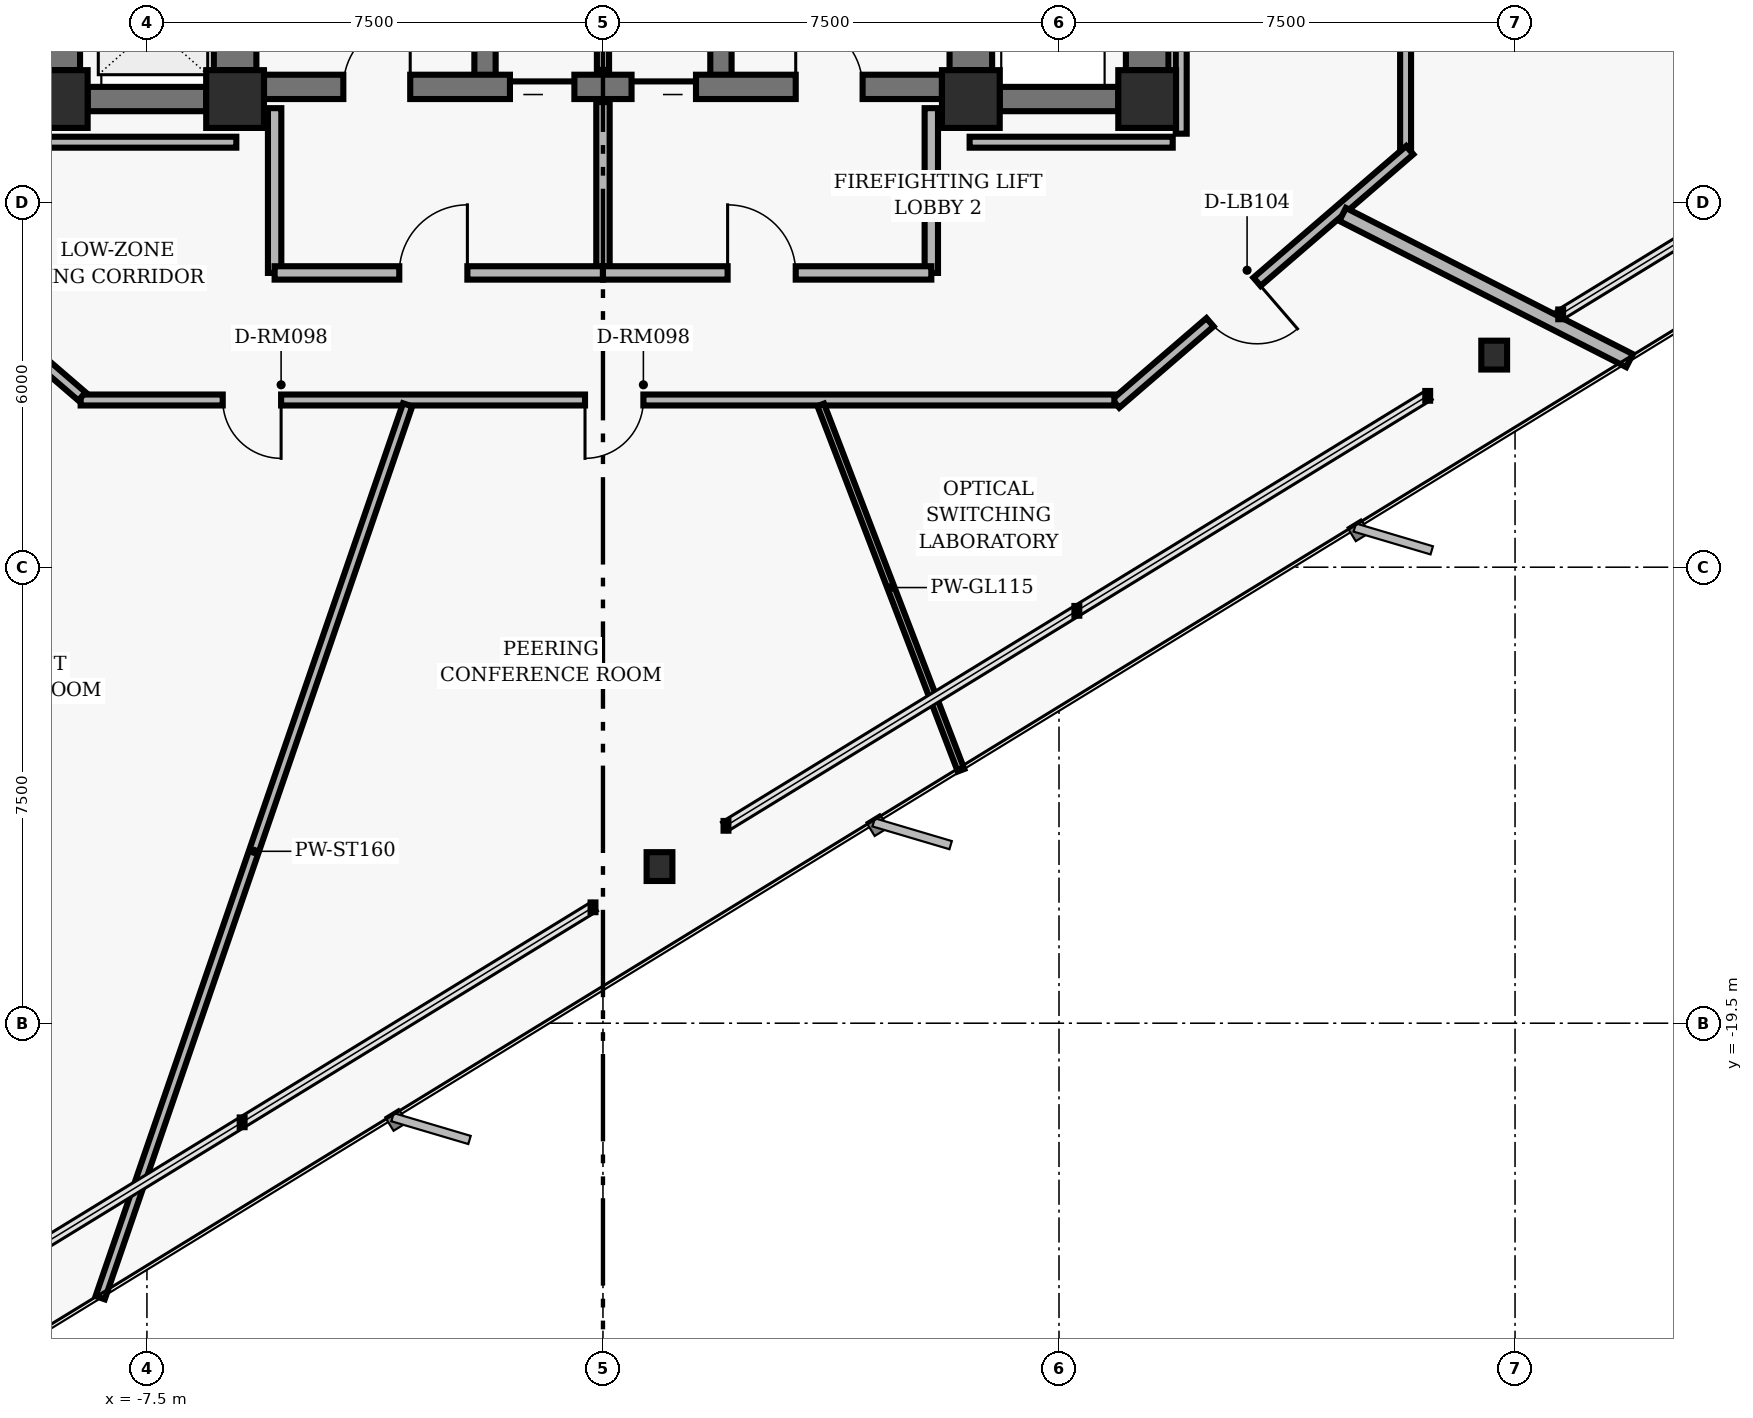
"""IFC4 building model, lengths in metres.
Left out: names, types, materials, properties, quantities, classifications, styles, units other than length and angle.
Written with IfcOpenShell. Run it as: python <this file> out.ifc"""

import sys

from ifc_helpers import new_model, si_unit, direction, frame, frame_2d, origin, origin_2d, place, context, subcontext, project, spatial, rectangle, hollow_rectangle, i_section, extrude, element, fill, save


model = new_model("IFC4")
c1 = context("Model", 3, precision=1e-05, world=origin(), true_north=direction((0.0, 1.0)))
c2 = subcontext(c1, "Body", "Model", "MODEL_VIEW")
j1 = project(units=[si_unit("LENGTHUNIT", "METRE"), si_unit("PLANEANGLEUNIT", "RADIAN")], contexts=[c1])
p1 = place(None, origin())
s1 = spatial("IfcSite", under=j1, at=p1, CompositionType="ELEMENT")
p2 = place(p1, origin())
s2 = spatial("IfcBuilding", under=s1, at=p2, CompositionType="ELEMENT")
p3 = place(p2, frame((0.0, 0.0, 32.32)))
s3 = spatial("IfcBuildingStorey", under=s2, at=p3, CompositionType="ELEMENT", Elevation=32.32)
for number, where, z_axis, x_axis in (
    (1, (-6.05, -4.3, 0.0), (0.0, 0.0, 1.0), (1.0, 0.0, 0.0)),
    (2, (6.05, -4.3, 0.0), (0.0, 0.0, 1.0), (1.0, 0.0, 0.0)),
    (3, (-8.95, -4.3, 0.0), (0.0, 0.0, 1.0), (1.0, 0.0, 0.0)),
    (4, (8.95, -4.3, 0.0), (0.0, 0.0, 1.0), (1.0, 0.0, 0.0)),
):
    element("IfcColumn", number, at=place(p3, frame(where, z_axis=z_axis, x_axis=x_axis)), inside=s3, PredefinedType="COLUMN", context=c2, shape_type="SweptSolid", body=[
        extrude(hollow_rectangle(XDim=0.95, YDim=0.95, WallThickness=0.06, InnerFilletRadius=0.02, OuterFilletRadius=0.04, at=origin_2d()), origin(), (0.0, 0.0, 1.0), 3.36),
    ])
for number, where, z_axis, x_axis in (
    (5, (-6.05, -3.825, 0.0), (0.0, 0.0, 1.0), (0.0, 1.0, 0.0)),
    (6, (6.05, -3.825, 0.0), (0.0, 0.0, 1.0), (0.0, 1.0, 0.0)),
):
    element("IfcWall", number, at=place(p3, frame(where, z_axis=z_axis, x_axis=x_axis)), inside=s3, PredefinedType="SHEAR", context=c2, shape_type="SweptSolid", body=[
        extrude(rectangle(XDim=3.35, YDim=0.7, at=frame_2d((1.675, 0.0))), origin(), (0.0, 0.0, 1.0), 3.098),
    ])
for number, where, z_axis, x_axis in (
    (7, (-1.94, -4.1, 0.0), (0.0, 0.0, 1.0), (0.0, 1.0, 0.0)),
    (8, (1.94, -4.1, 0.0), (0.0, 0.0, 1.0), (0.0, 1.0, 0.0)),
):
    element("IfcWall", number, at=place(p3, frame(where, z_axis=z_axis, x_axis=x_axis)), inside=s3, PredefinedType="SHEAR", context=c2, shape_type="SweptSolid", body=[
        extrude(rectangle(XDim=8.2, YDim=0.35, at=frame_2d((4.1, 0.0))), origin(), (0.0, 0.0, 1.0), 3.098),
    ])
p4 = place(p3, frame((-5.575, -4.1, 0.0), z_axis=(0.0, 0.0, 1.0), x_axis=(1.0, 0.0, 0.0)))
e9 = element("IfcWall", 9, at=p4, inside=s3, PredefinedType="SHEAR", context=c2, shape_type="SweptSolid", body=[
    extrude(rectangle(XDim=11.15, YDim=0.4, at=frame_2d((5.575, 0.0))), origin(), (0.0, 0.0, 1.0), 3.098),
])
p5 = place(p4, frame((1.305, 0.0, 0.0)))
e10 = element("IfcOpeningElement", 10, at=p5, cuts=e9, PredefinedType="OPENING", context=c2, shape_type="SweptSolid", body=[
    extrude(rectangle(XDim=1.1, YDim=2.04, at=frame_2d((0.55, 1.02))), frame((0.0, 0.21, 0.0), z_axis=(0.0, -1.0, 0.0), x_axis=(1.0, 0.0, 0.0)), (0.0, 0.0, 1.0), 0.42),
])
p6 = place(p4, frame((8.745, 0.0, 0.0)))
e11 = element("IfcOpeningElement", 11, at=p6, cuts=e9, PredefinedType="OPENING", context=c2, shape_type="SweptSolid", body=[
    extrude(rectangle(XDim=1.1, YDim=2.04, at=frame_2d((0.55, 1.02))), frame((0.0, 0.21, 0.0), z_axis=(0.0, -1.0, 0.0), x_axis=(1.0, 0.0, 0.0)), (0.0, 0.0, 1.0), 0.42),
])
p7 = place(p4, frame((4.045, 0.0, 0.0)))
e12 = element("IfcOpeningElement", 12, at=p7, cuts=e9, PredefinedType="OPENING", context=c2, shape_type="SweptSolid", body=[
    extrude(rectangle(XDim=1.06, YDim=2.04, at=frame_2d((0.53, 1.02))), frame((0.0, 0.21, 0.0), z_axis=(0.0, -1.0, 0.0), x_axis=(1.0, 0.0, 0.0)), (0.0, 0.0, 1.0), 0.42),
])
p8 = place(p4, frame((6.045, 0.0, 0.0)))
e13 = element("IfcOpeningElement", 13, at=p8, cuts=e9, PredefinedType="OPENING", context=c2, shape_type="SweptSolid", body=[
    extrude(rectangle(XDim=1.06, YDim=2.04, at=frame_2d((0.53, 1.02))), frame((0.0, 0.21, 0.0), z_axis=(0.0, -1.0, 0.0), x_axis=(1.0, 0.0, 0.0)), (0.0, 0.0, 1.0), 0.42),
])
p9 = place(p3, frame((-8.95, -3.825, 0.0), z_axis=(0.0, 0.0, 1.0), x_axis=(0.0, 1.0, 0.0)))
e14 = element("IfcWall", 14, at=p9, inside=s3, PredefinedType="SHEAR", context=c2, shape_type="SweptSolid", body=[
    extrude(rectangle(XDim=7.85, YDim=0.7, at=frame_2d((3.925, 0.0))), origin(), (0.0, 0.0, 1.0), 3.098),
])
p10 = place(p9, frame((0.55, 0.0, 0.0)))
e15 = element("IfcOpeningElement", 15, at=p10, cuts=e14, PredefinedType="OPENING", context=c2, shape_type="SweptSolid", body=[
    extrude(rectangle(XDim=1.06, YDim=2.04, at=frame_2d((0.53, 1.02))), frame((0.0, 0.36, 0.0), z_axis=(0.0, -1.0, 0.0), x_axis=(1.0, 0.0, 0.0)), (0.0, 0.0, 1.0), 0.72),
])
p11 = place(p9, frame((3.395, 0.0, 0.0)))
e16 = element("IfcOpeningElement", 16, at=p11, cuts=e14, PredefinedType="OPENING", context=c2, shape_type="SweptSolid", body=[
    extrude(rectangle(XDim=1.06, YDim=2.04, at=frame_2d((0.53, 1.02))), frame((0.0, 0.36, 0.0), z_axis=(0.0, -1.0, 0.0), x_axis=(1.0, 0.0, 0.0)), (0.0, 0.0, 1.0), 0.72),
])
p12 = place(p9, frame((6.23, 0.0, 0.0)))
e17 = element("IfcOpeningElement", 17, at=p12, cuts=e14, PredefinedType="OPENING", context=c2, shape_type="SweptSolid", body=[
    extrude(rectangle(XDim=1.06, YDim=2.04, at=frame_2d((0.53, 1.02))), frame((0.0, 0.36, 0.0), z_axis=(0.0, -1.0, 0.0), x_axis=(1.0, 0.0, 0.0)), (0.0, 0.0, 1.0), 0.72),
])
p13 = place(p3, frame((-8.475, -4.3, 0.0), z_axis=(0.0, 0.0, 1.0), x_axis=(1.0, 0.0, 0.0)))
e18 = element("IfcWall", 18, at=p13, inside=s3, PredefinedType="SHEAR", context=c2, shape_type="SweptSolid", body=[
    extrude(rectangle(XDim=1.95, YDim=0.4, at=frame_2d((0.975, 0.0))), origin(), (0.0, 0.0, 1.0), 3.098),
])
p14 = place(p3, frame((8.95, -3.825, 0.0), z_axis=(0.0, 0.0, 1.0), x_axis=(0.0, 1.0, 0.0)))
e19 = element("IfcWall", 19, at=p14, inside=s3, PredefinedType="SHEAR", context=c2, shape_type="SweptSolid", body=[
    extrude(rectangle(XDim=7.85, YDim=0.7, at=frame_2d((3.925, 0.0))), origin(), (0.0, 0.0, 1.0), 3.098),
])
p15 = place(p3, frame((6.525, -4.3, 0.0), z_axis=(0.0, 0.0, 1.0), x_axis=(1.0, 0.0, 0.0)))
e20 = element("IfcWall", 20, at=p15, inside=s3, PredefinedType="SHEAR", context=c2, shape_type="SweptSolid", body=[
    extrude(rectangle(XDim=1.95, YDim=0.4, at=frame_2d((0.975, 0.0))), origin(), (0.0, 0.0, 1.0), 3.098),
])
for number, where, z_axis, x_axis in (
    (21, (0.93, -16.924, 0.0), (0.0, 0.0, 1.0), (1.0, 0.0, 0.0)),
    (22, (14.657, -8.512, 0.0), (0.0, 0.0, 1.0), (1.0, 0.0, 0.0)),
):
    element("IfcColumn", number, at=place(p3, frame(where, z_axis=z_axis, x_axis=x_axis)), inside=s3, PredefinedType="COLUMN", context=c2, shape_type="SweptSolid", body=[
        extrude(i_section(OverallWidth=0.424, OverallDepth=0.474, WebThickness=0.048, FlangeThickness=0.077, FilletRadius=0.025, at=origin_2d()), origin(), (0.0, 0.0, 1.0), 3.36),
    ])
p16 = place(p3, frame((0.0, -3.82, 0.0), z_axis=(0.0, 0.0, 1.0), x_axis=(0.0, 1.0, 0.0)))
e23 = element("IfcWall", 23, at=p16, inside=s3, PredefinedType="PARTITIONING", context=c2, shape_type="SweptSolid", body=[
    extrude(rectangle(XDim=2.67, YDim=0.2, at=frame_2d((1.335, 0.0))), origin(), (0.0, 0.0, 1.0), 3.073),
])
for number, where, z_axis, x_axis in (
    (24, (-5.4, -7.16, 0.0), (0.0, 0.0, 1.0), (0.0, 1.0, 0.0)),
    (25, (5.4, -7.16, 0.0), (0.0, 0.0, 1.0), (0.0, 1.0, 0.0)),
):
    element("IfcWall", number, at=place(p3, frame(where, z_axis=z_axis, x_axis=x_axis)), inside=s3, PredefinedType="PARTITIONING", context=c2, shape_type="SweptSolid", body=[
        extrude(rectangle(XDim=2.71, YDim=0.22, at=frame_2d((1.355, 0.0))), origin(), (0.0, 0.0, 1.0), 3.073),
    ])
p17 = place(p3, frame((0.0, -7.16, 0.0), z_axis=(0.0, 0.0, 1.0), x_axis=(0.0, 1.0, 0.0)))
e26 = element("IfcWall", 26, at=p17, inside=s3, PredefinedType="PARTITIONING", context=c2, shape_type="SweptSolid", body=[
    extrude(rectangle(XDim=2.81, YDim=0.22, at=frame_2d((1.405, 0.0))), origin(), (0.0, 0.0, 1.0), 3.073),
])
p18 = place(p3, frame((-5.4, -7.16, 0.0), z_axis=(0.0, 0.0, 1.0), x_axis=(1.0, 0.0, 0.0)))
e27 = element("IfcWall", 27, at=p18, inside=s3, PredefinedType="PARTITIONING", context=c2, shape_type="SweptSolid", body=[
    extrude(rectangle(XDim=5.4, YDim=0.22, at=frame_2d((2.7, 0.0))), origin(), (0.0, 0.0, 1.0), 3.073),
])
p19 = place(p18, frame((2.05, 0.0, 0.0)))
e28 = element("IfcOpeningElement", 28, at=p19, cuts=e27, PredefinedType="OPENING", context=c2, shape_type="SweptSolid", body=[
    extrude(rectangle(XDim=1.12, YDim=2.02, at=frame_2d((0.56, 1.01))), frame((0.0, 0.12, 0.0), z_axis=(0.0, -1.0, 0.0), x_axis=(1.0, 0.0, 0.0)), (0.0, 0.0, 1.0), 0.24),
])
p20 = place(p3, frame((0.0, -7.16, 0.0), z_axis=(0.0, 0.0, 1.0), x_axis=(1.0, 0.0, 0.0)))
e29 = element("IfcWall", 29, at=p20, inside=s3, PredefinedType="PARTITIONING", context=c2, shape_type="SweptSolid", body=[
    extrude(rectangle(XDim=5.4, YDim=0.22, at=frame_2d((2.7, 0.0))), origin(), (0.0, 0.0, 1.0), 3.073),
])
p21 = place(p20, frame((2.05, 0.0, 0.0)))
e30 = element("IfcOpeningElement", 30, at=p21, cuts=e29, PredefinedType="OPENING", context=c2, shape_type="SweptSolid", body=[
    extrude(rectangle(XDim=1.12, YDim=2.02, at=frame_2d((0.56, 1.01))), frame((0.0, 0.12, 0.0), z_axis=(0.0, -1.0, 0.0), x_axis=(1.0, 0.0, 0.0)), (0.0, 0.0, 1.0), 0.24),
])
p22 = place(p3, frame((13.2, 5.11, 0.0), z_axis=(0.0, 0.0, 1.0), x_axis=(0.0, -1.0, 0.0)))
e31 = element("IfcWall", 31, at=p22, inside=s3, PredefinedType="PARTITIONING", context=c2, shape_type="SweptSolid", body=[
    extrude(rectangle(XDim=10.22, YDim=0.18, at=frame_2d((5.11, 0.0))), origin(), (0.0, 0.0, 1.0), 3.073),
])
p23 = place(p22, frame((5.277, 0.0, 0.0)))
e32 = element("IfcOpeningElement", 32, at=p23, cuts=e31, PredefinedType="OPENING", context=c2, shape_type="SweptSolid", body=[
    extrude(rectangle(XDim=0.96, YDim=2.02, at=frame_2d((0.48, 1.01))), frame((0.0, 0.1, 0.0), z_axis=(0.0, -1.0, 0.0), x_axis=(1.0, 0.0, 0.0)), (0.0, 0.0, 1.0), 0.2),
])
p24 = place(p3, frame((13.268, -5.141, 0.0), z_axis=(0.0, 0.0, 1.0), x_axis=(-0.757534501725, -0.65279512766, 0.0)))
e33 = element("IfcWall", 33, at=p24, inside=s3, PredefinedType="PARTITIONING", context=c2, shape_type="SweptSolid", body=[
    extrude(rectangle(XDim=6.385, YDim=0.18, at=frame_2d((3.192, 0.0))), origin(), (0.0, 0.0, 1.0), 2.587),
])
p25 = place(p24, frame((3.316, 0.0, 0.0)))
e34 = element("IfcOpeningElement", 34, at=p25, cuts=e33, PredefinedType="OPENING", context=c2, shape_type="SweptSolid", body=[
    extrude(rectangle(XDim=1.02, YDim=2.02, at=frame_2d((0.51, 1.01))), frame((0.0, 0.1, 0.0), z_axis=(0.0, -1.0, 0.0), x_axis=(1.0, 0.0, 0.0)), (0.0, 0.0, 1.0), 0.2),
])
p26 = place(p3, frame((8.41, -9.25, 0.0), z_axis=(0.0, 0.0, 1.0), x_axis=(-1.0, 0.0, 0.0)))
e35 = element("IfcWall", 35, at=p26, inside=s3, PredefinedType="PARTITIONING", context=c2, shape_type="SweptSolid", body=[
    extrude(rectangle(XDim=17.0, YDim=0.18, at=frame_2d((8.5, 0.0))), origin(), (0.0, 0.0, 1.0), 2.587),
])
p27 = place(p26, frame((13.703, 0.0, 0.0)))
e36 = element("IfcOpeningElement", 36, at=p27, cuts=e35, PredefinedType="OPENING", context=c2, shape_type="SweptSolid", body=[
    extrude(rectangle(XDim=0.96, YDim=2.02, at=frame_2d((0.48, 1.01))), frame((0.0, 0.1, 0.0), z_axis=(0.0, -1.0, 0.0), x_axis=(1.0, 0.0, 0.0)), (0.0, 0.0, 1.0), 0.2),
])
p28 = place(p26, frame((7.745, 0.0, 0.0)))
e37 = element("IfcOpeningElement", 37, at=p28, cuts=e35, PredefinedType="OPENING", context=c2, shape_type="SweptSolid", body=[
    extrude(rectangle(XDim=0.96, YDim=2.02, at=frame_2d((0.48, 1.01))), frame((0.0, 0.1, 0.0), z_axis=(0.0, -1.0, 0.0), x_axis=(1.0, 0.0, 0.0)), (0.0, 0.0, 1.0), 0.2),
])
p29 = place(p3, frame((-8.568, -9.191, 0.0), z_axis=(0.0, 0.0, 1.0), x_axis=(-0.757556899173, 0.652769135694, 0.0)))
e38 = element("IfcWall", 38, at=p29, inside=s3, PredefinedType="PARTITIONING", context=c2, shape_type="SweptSolid", body=[
    extrude(rectangle(XDim=6.204, YDim=0.18, at=frame_2d((3.102, 0.0))), origin(), (0.0, 0.0, 1.0), 3.073),
])
for number, where, z_axis, x_axis in (
    (39, (-9.37, -5.01, 0.0), (0.0, 0.0, 1.0), (1.0, 0.0, 0.0)),
    (40, (6.03, -5.01, 0.0), (0.0, 0.0, 1.0), (1.0, 0.0, 0.0)),
):
    element("IfcWall", number, at=place(p3, frame(where, z_axis=z_axis, x_axis=x_axis)), inside=s3, PredefinedType="PARTITIONING", context=c2, shape_type="SweptSolid", body=[
        extrude(rectangle(XDim=3.34, YDim=0.18, at=frame_2d((1.67, 0.0))), origin(), (0.0, 0.0, 1.0), 3.073),
    ])
p30 = place(p3, frame((9.51, -4.87, 0.0), z_axis=(0.0, 0.0, 1.0), x_axis=(0.0, 1.0, 0.0)))
e41 = element("IfcWall", 41, at=p30, inside=s3, PredefinedType="PARTITIONING", context=c2, shape_type="SweptSolid", body=[
    extrude(rectangle(XDim=9.74, YDim=0.18, at=frame_2d((4.87, 0.0))), origin(), (0.0, 0.0, 1.0), 3.073),
])
p31 = place(p3, frame((-3.213, -9.33, 0.0), z_axis=(0.0, 0.0, 1.0), x_axis=(-0.325559016245, -0.945521722089, 0.0)))
e42 = element("IfcWall", 42, at=p31, inside=s3, PredefinedType="PARTITIONING", context=c2, shape_type="SweptSolid", body=[
    extrude(rectangle(XDim=15.531, YDim=0.16, at=frame_2d((7.766, 0.0))), origin(), (0.0, 0.0, 1.0), 3.073),
])
p32 = place(p3, frame((3.582, -9.33, 0.0), z_axis=(0.0, 0.0, 1.0), x_axis=(0.358341066906, -0.933590745332, 0.0)))
e43 = element("IfcWall", 43, at=p32, inside=s3, PredefinedType="MOVABLE", context=c2, shape_type="SweptSolid", body=[
    extrude(rectangle(XDim=6.437, YDim=0.115, at=frame_2d((3.219, 0.0))), origin(), (0.0, 0.0, 1.0), 3.073),
])
p33 = place(p3, frame((12.164, -6.198, 0.0), z_axis=(0.0, 0.0, 1.0), x_axis=(0.890999034188, -0.454005199394, 0.0)))
e44 = element("IfcWall", 44, at=p33, inside=s3, PredefinedType="PARTITIONING", context=c2, shape_type="SweptSolid", body=[
    extrude(rectangle(XDim=5.296, YDim=0.24, at=frame_2d((2.648, 0.0))), origin(), (0.0, 0.0, 1.0), 2.358),
])
p34 = place(p5, origin())
e45 = element("IfcDoor", 45, at=p34, inside=s3, OperationType="SINGLE_SWING_RIGHT", PredefinedType="DOOR", context=c2, shape_type="SweptSolid", body=[
    extrude(rectangle(XDim=1.1, YDim=2.04, at=frame_2d((0.55, 1.02))), frame((0.0, 0.025, 0.0), z_axis=(0.0, -1.0, 0.0), x_axis=(1.0, 0.0, 0.0)), (0.0, 0.0, 1.0), 0.05),
])
fill(e10, e45)
p35 = place(p6, origin())
e46 = element("IfcDoor", 46, at=p35, inside=s3, OperationType="SINGLE_SWING_LEFT", PredefinedType="DOOR", context=c2, shape_type="SweptSolid", body=[
    extrude(rectangle(XDim=1.1, YDim=2.04, at=frame_2d((0.55, 1.02))), frame((0.0, 0.025, 0.0), z_axis=(0.0, -1.0, 0.0), x_axis=(1.0, 0.0, 0.0)), (0.0, 0.0, 1.0), 0.05),
])
fill(e11, e46)
p36 = place(p7, origin())
e47 = element("IfcDoor", 47, at=p36, inside=s3, OperationType="SLIDING_TO_LEFT", PredefinedType="DOOR", context=c2, shape_type="SweptSolid", body=[
    extrude(rectangle(XDim=1.06, YDim=2.04, at=frame_2d((0.53, 1.02))), frame((0.0, 0.025, 0.0), z_axis=(0.0, -1.0, 0.0), x_axis=(1.0, 0.0, 0.0)), (0.0, 0.0, 1.0), 0.05),
])
fill(e12, e47)
p37 = place(p8, origin())
e48 = element("IfcDoor", 48, at=p37, inside=s3, OperationType="SLIDING_TO_RIGHT", PredefinedType="DOOR", context=c2, shape_type="SweptSolid", body=[
    extrude(rectangle(XDim=1.06, YDim=2.04, at=frame_2d((0.53, 1.02))), frame((0.0, 0.025, 0.0), z_axis=(0.0, -1.0, 0.0), x_axis=(1.0, 0.0, 0.0)), (0.0, 0.0, 1.0), 0.05),
])
fill(e13, e48)
p38 = place(p19, origin())
e49 = element("IfcDoor", 49, at=p38, inside=s3, OperationType="SINGLE_SWING_RIGHT", PredefinedType="DOOR", context=c2, shape_type="SweptSolid", body=[
    extrude(rectangle(XDim=1.12, YDim=2.02, at=frame_2d((0.56, 1.01))), frame((0.0, 0.025, 0.0), z_axis=(0.0, -1.0, 0.0), x_axis=(1.0, 0.0, 0.0)), (0.0, 0.0, 1.0), 0.05),
])
fill(e28, e49)
p39 = place(p21, origin())
e50 = element("IfcDoor", 50, at=p39, inside=s3, OperationType="SINGLE_SWING_LEFT", PredefinedType="DOOR", context=c2, shape_type="SweptSolid", body=[
    extrude(rectangle(XDim=1.12, YDim=2.02, at=frame_2d((0.56, 1.01))), frame((0.0, 0.025, 0.0), z_axis=(0.0, -1.0, 0.0), x_axis=(1.0, 0.0, 0.0)), (0.0, 0.0, 1.0), 0.05),
])
fill(e30, e50)
p40 = place(p27, origin())
e51 = element("IfcDoor", 51, at=p40, inside=s3, OperationType="SINGLE_SWING_LEFT", PredefinedType="DOOR", context=c2, shape_type="SweptSolid", body=[
    extrude(rectangle(XDim=0.96, YDim=2.02, at=frame_2d((0.48, 1.01))), frame((0.0, 0.025, 0.0), z_axis=(0.0, -1.0, 0.0), x_axis=(1.0, 0.0, 0.0)), (0.0, 0.0, 1.0), 0.05),
])
fill(e36, e51)
p41 = place(p28, origin())
e52 = element("IfcDoor", 52, at=p41, inside=s3, OperationType="SINGLE_SWING_RIGHT", PredefinedType="DOOR", context=c2, shape_type="SweptSolid", body=[
    extrude(rectangle(XDim=0.96, YDim=2.02, at=frame_2d((0.48, 1.01))), frame((0.0, 0.025, 0.0), z_axis=(0.0, -1.0, 0.0), x_axis=(1.0, 0.0, 0.0)), (0.0, 0.0, 1.0), 0.05),
])
fill(e37, e52)
p42 = place(p25, origin())
e53 = element("IfcDoor", 53, at=p42, inside=s3, OperationType="SINGLE_SWING_LEFT", PredefinedType="DOOR", context=c2, shape_type="SweptSolid", body=[
    extrude(rectangle(XDim=1.02, YDim=2.02, at=frame_2d((0.51, 1.01))), frame((0.0, 0.025, 0.0), z_axis=(0.0, -1.0, 0.0), x_axis=(1.0, 0.0, 0.0)), (0.0, 0.0, 1.0), 0.05),
])
fill(e34, e53)
save(model, sys.argv[1])
